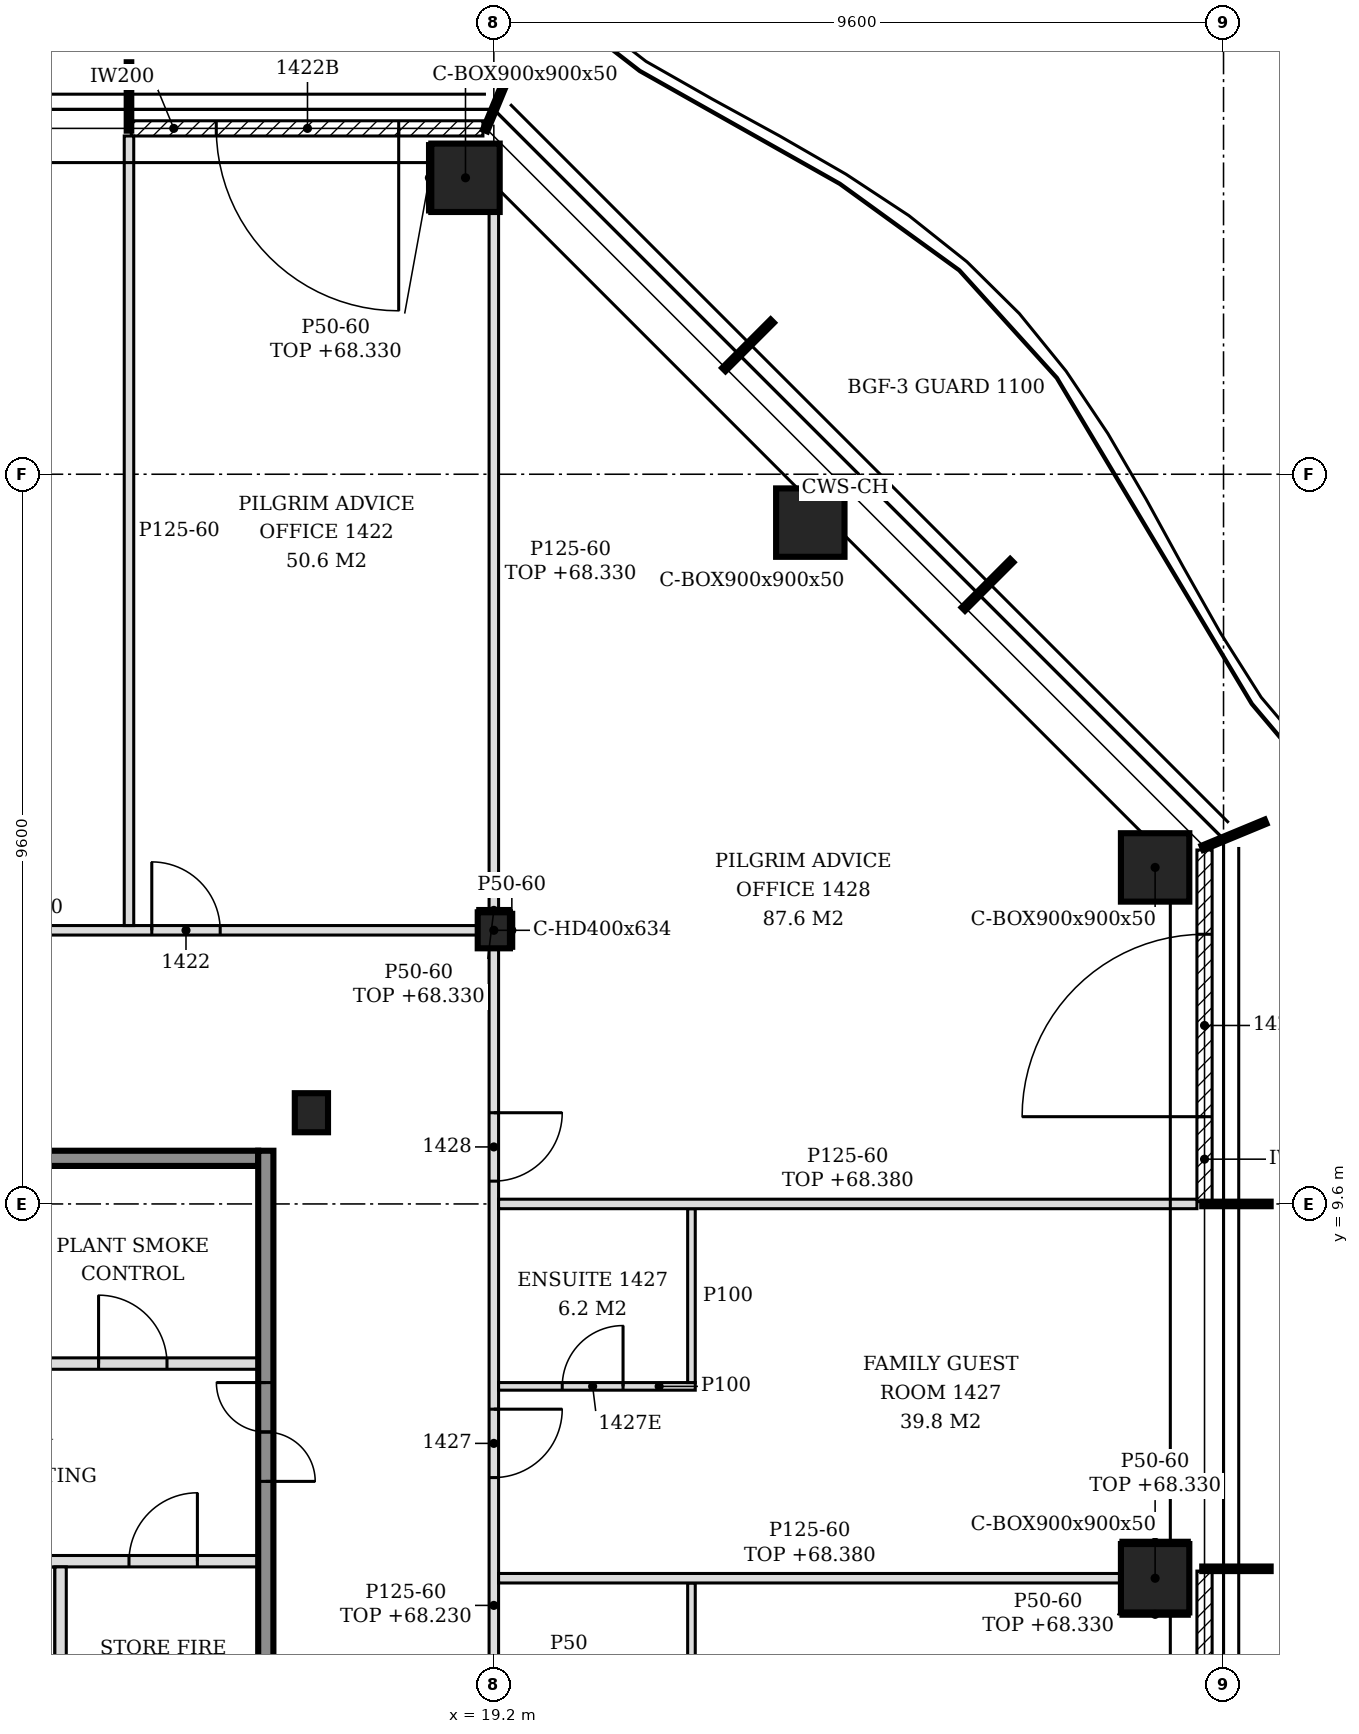
"""IFC4 building model, lengths in metres.
Left out: names, types, materials, properties, quantities, classifications, styles, units other than length and angle.
Written with IfcOpenShell. Run it as: python <this file> out.ifc"""

import sys

from ifc_helpers import new_model, si_unit, direction, frame, frame_2d, origin, origin_2d, place, context, subcontext, project, spatial, polyline, rectangle, hollow_rectangle, i_section, outline, extrude, element, fill, save


model = new_model("IFC4")
c1 = context("Model", 3, precision=1e-05, world=origin(), true_north=direction((0.0, 1.0)))
c2 = subcontext(c1, "Body", "Model", "MODEL_VIEW")
j1 = project(units=[si_unit("LENGTHUNIT", "METRE"), si_unit("PLANEANGLEUNIT", "RADIAN")], contexts=[c1])
p1 = place(None, origin())
s1 = spatial("IfcSite", under=j1, at=p1, CompositionType="ELEMENT")
p2 = place(p1, origin())
s2 = spatial("IfcBuilding", under=s1, at=p2, CompositionType="ELEMENT")
p3 = place(p2, frame((0.0, 0.0, 65.4)))
s3 = spatial("IfcBuildingStorey", under=s2, at=p3, CompositionType="ELEMENT", Elevation=65.4)
for number, where, z_axis, x_axis in (
    (1, (27.9, 4.676, -0.15), (0.0, 0.0, 1.0), (1.0, 0.0, 0.0)),
    (2, (27.9, 14.027, -0.15), (0.0, 0.0, 1.0), (1.0, 0.0, 0.0)),
    (3, (23.364, 18.564, -0.15), (0.0, 0.0, 1.0), (1.0, 0.0, 0.0)),
    (4, (18.827, 23.1, -0.15), (0.0, 0.0, 1.0), (1.0, 0.0, 0.0)),
):
    element("IfcColumn", number, at=place(p3, frame(where, z_axis=z_axis, x_axis=x_axis)), inside=s3, PredefinedType="COLUMN", context=c2, shape_type="SweptSolid", body=[
        extrude(hollow_rectangle(XDim=0.9, YDim=0.9, WallThickness=0.05, at=origin_2d()), origin(), (0.0, 0.0, 1.0), 3.6),
    ])
p4 = place(p3, frame((19.2, 13.2, -0.15), z_axis=(0.0, 0.0, 1.0), x_axis=(1.0, 0.0, 0.0)))
e5 = element("IfcColumn", 5, at=p4, inside=s3, PredefinedType="COLUMN", context=c2, shape_type="SweptSolid", body=[
    extrude(i_section(OverallWidth=0.424, OverallDepth=0.474, WebThickness=0.048, FlangeThickness=0.077, FilletRadius=0.015, at=origin_2d()), origin(), (0.0, 0.0, 1.0), 3.6),
])
p5 = place(p3, frame((16.8, 10.8, -0.15), z_axis=(0.0, 0.0, 1.0), x_axis=(1.0, 0.0, 0.0)))
e6 = element("IfcColumn", 6, at=p5, inside=s3, PredefinedType="COLUMN", context=c2, shape_type="SweptSolid", body=[
    extrude(i_section(OverallWidth=0.437, OverallDepth=0.514, WebThickness=0.061, FlangeThickness=0.097, FilletRadius=0.015, at=origin_2d()), origin(), (0.0, 0.0, 1.0), 3.6),
])
p6 = place(p3, frame((28.55, 0.03, 0.0), z_axis=(0.0, 0.0, 1.0), x_axis=(0.0, 1.0, 0.0)))
e7 = element("IfcWall", 7, at=p6, inside=s3, PredefinedType="NOTDEFINED", context=c2, shape_type="SweptSolid", body=[
    extrude(rectangle(XDim=4.74, YDim=0.2, at=frame_2d((2.37, 0.0))), origin(), (0.0, 0.0, 1.0), 3.45),
])
p7 = place(p6, frame((1.17, 0.0, 0.0)))
e8 = element("IfcOpeningElement", 8, at=p7, cuts=e7, PredefinedType="OPENING", context=c2, shape_type="SweptSolid", body=[
    extrude(rectangle(XDim=2.4, YDim=2.4, at=frame_2d((1.2, 1.2))), frame((0.0, 0.11, 0.0), z_axis=(0.0, -1.0, 0.0), x_axis=(1.0, 0.0, 0.0)), (0.0, 0.0, 1.0), 0.22),
])
p8 = place(p3, frame((28.55, 9.63, 0.0), z_axis=(0.0, 0.0, 1.0), x_axis=(0.0, 1.0, 0.0)))
e9 = element("IfcWall", 9, at=p8, inside=s3, PredefinedType="NOTDEFINED", context=c2, shape_type="SweptSolid", body=[
    extrude(rectangle(XDim=4.626, YDim=0.2, at=frame_2d((2.313, 0.0))), origin(), (0.0, 0.0, 1.0), 3.45),
])
p9 = place(p8, frame((1.118, 0.0, 0.0)))
e10 = element("IfcOpeningElement", 10, at=p9, cuts=e9, PredefinedType="OPENING", context=c2, shape_type="SweptSolid", body=[
    extrude(rectangle(XDim=2.4, YDim=2.4, at=frame_2d((1.2, 1.2))), frame((0.0, 0.11, 0.0), z_axis=(0.0, -1.0, 0.0), x_axis=(1.0, 0.0, 0.0)), (0.0, 0.0, 1.0), 0.22),
])
p10 = place(p3, frame((19.056, 23.75, 0.0), z_axis=(0.0, 0.0, 1.0), x_axis=(-1.0, 0.0, 0.0)))
e11 = element("IfcWall", 11, at=p10, inside=s3, PredefinedType="NOTDEFINED", context=c2, shape_type="SweptSolid", body=[
    extrude(rectangle(XDim=4.626, YDim=0.2, at=frame_2d((2.313, 0.0))), origin(), (0.0, 0.0, 1.0), 3.45),
])
p11 = place(p10, frame((1.108, 0.0, 0.0)))
e12 = element("IfcOpeningElement", 12, at=p11, cuts=e11, PredefinedType="OPENING", context=c2, shape_type="SweptSolid", body=[
    extrude(rectangle(XDim=2.4, YDim=2.4, at=frame_2d((1.2, 1.2))), frame((0.0, 0.11, 0.0), z_axis=(0.0, -1.0, 0.0), x_axis=(1.0, 0.0, 0.0)), (0.0, 0.0, 1.0), 0.22),
])
p12 = place(p3, frame((9.7, 4.9, 0.0), z_axis=(0.0, 0.0, 1.0), x_axis=(1.0, 0.0, 0.0)))
e13 = element("IfcWall", 13, at=p12, inside=s3, PredefinedType="SOLIDWALL", context=c2, shape_type="SweptSolid", body=[
    extrude(rectangle(XDim=6.4, YDim=0.15, at=frame_2d((3.2, 0.0))), origin(), (0.0, 0.0, 1.0), 3.45),
])
p13 = place(p12, frame((0.45, 0.0, 0.0)))
e14 = element("IfcOpeningElement", 14, at=p13, cuts=e13, PredefinedType="OPENING", context=c2, shape_type="SweptSolid", body=[
    extrude(rectangle(XDim=1.0, YDim=2.1, at=frame_2d((0.5, 1.05))), frame((0.0, 0.085, 0.0), z_axis=(0.0, -1.0, 0.0), x_axis=(1.0, 0.0, 0.0)), (0.0, 0.0, 1.0), 0.17),
])
p14 = place(p12, frame((2.35, 0.0, 0.0)))
e15 = element("IfcOpeningElement", 15, at=p14, cuts=e13, PredefinedType="OPENING", context=c2, shape_type="SweptSolid", body=[
    extrude(rectangle(XDim=1.0, YDim=2.1, at=frame_2d((0.5, 1.05))), frame((0.0, 0.085, 0.0), z_axis=(0.0, -1.0, 0.0), x_axis=(1.0, 0.0, 0.0)), (0.0, 0.0, 1.0), 0.17),
])
p15 = place(p12, frame((4.7, 0.0, 0.0)))
e16 = element("IfcOpeningElement", 16, at=p15, cuts=e13, PredefinedType="OPENING", context=c2, shape_type="SweptSolid", body=[
    extrude(rectangle(XDim=0.9, YDim=2.1, at=frame_2d((0.45, 1.05))), frame((0.0, 0.085, 0.0), z_axis=(0.0, -1.0, 0.0), x_axis=(1.0, 0.0, 0.0)), (0.0, 0.0, 1.0), 0.17),
])
p16 = place(p3, frame((12.7, 7.5, 0.0), z_axis=(0.0, 0.0, 1.0), x_axis=(1.0, 0.0, 0.0)))
e17 = element("IfcWall", 17, at=p16, inside=s3, PredefinedType="SOLIDWALL", context=c2, shape_type="SweptSolid", body=[
    extrude(rectangle(XDim=3.4, YDim=0.15, at=frame_2d((1.7, 0.0))), origin(), (0.0, 0.0, 1.0), 3.45),
])
p17 = place(p16, frame((1.3, 0.0, 0.0)))
e18 = element("IfcOpeningElement", 18, at=p17, cuts=e17, PredefinedType="OPENING", context=c2, shape_type="SweptSolid", body=[
    extrude(rectangle(XDim=0.9, YDim=2.1, at=frame_2d((0.45, 1.05))), frame((0.0, 0.085, 0.0), z_axis=(0.0, -1.0, 0.0), x_axis=(1.0, 0.0, 0.0)), (0.0, 0.0, 1.0), 0.17),
])
p18 = place(p3, frame((12.7, 10.2, 0.0), z_axis=(0.0, 0.0, 1.0), x_axis=(1.0, 0.0, 0.0)))
e19 = element("IfcWall", 19, at=p18, inside=s3, PredefinedType="SOLIDWALL", context=c2, shape_type="SweptSolid", body=[
    extrude(rectangle(XDim=3.4, YDim=0.2, at=frame_2d((1.7, 0.0))), origin(), (0.0, 0.0, 1.0), 3.45),
])
p19 = place(p3, frame((13.5, 2.275, 0.0), z_axis=(0.0, 0.0, 1.0), x_axis=(0.0, 1.0, 0.0)))
e20 = element("IfcWall", 20, at=p19, inside=s3, PredefinedType="SOLIDWALL", context=c2, shape_type="SweptSolid", body=[
    extrude(rectangle(XDim=2.55, YDim=0.15, at=frame_2d((1.275, 0.0))), origin(), (0.0, 0.0, 1.0), 3.45),
])
p20 = place(p3, frame((16.2, -5.5, 0.0), z_axis=(0.0, 0.0, 1.0), x_axis=(0.0, 1.0, 0.0)))
e21 = element("IfcWall", 21, at=p20, inside=s3, PredefinedType="SOLIDWALL", context=c2, shape_type="SweptSolid", body=[
    extrude(rectangle(XDim=15.8, YDim=0.2, at=frame_2d((7.9, 0.0))), origin(), (0.0, 0.0, 1.0), 3.45),
])
p21 = place(p20, frame((3.05, 0.0, 0.0)))
e22 = element("IfcOpeningElement", 22, at=p21, cuts=e21, PredefinedType="OPENING", context=c2, shape_type="SweptSolid", body=[
    extrude(rectangle(XDim=1.3, YDim=2.1, at=frame_2d((0.65, 1.05))), frame((0.0, 0.11, 0.0), z_axis=(0.0, -1.0, 0.0), x_axis=(1.0, 0.0, 0.0)), (0.0, 0.0, 1.0), 0.22),
])
p22 = place(p20, frame((11.45, 0.0, 0.0)))
e23 = element("IfcOpeningElement", 23, at=p22, cuts=e21, PredefinedType="OPENING", context=c2, shape_type="SweptSolid", body=[
    extrude(rectangle(XDim=1.3, YDim=2.1, at=frame_2d((0.65, 1.05))), frame((0.0, 0.11, 0.0), z_axis=(0.0, -1.0, 0.0), x_axis=(1.0, 0.0, 0.0)), (0.0, 0.0, 1.0), 0.22),
])
p23 = place(p3, frame((21.8, 2.326, 0.0), z_axis=(0.0, 0.0, 1.0), x_axis=(0.0, 1.0, 0.0)))
e24 = element("IfcWall", 24, at=p23, inside=s3, PredefinedType="PARTITIONING", context=c2, shape_type="SweptSolid", body=[
    extrude(rectangle(XDim=2.288, YDim=0.1, at=frame_2d((1.144, 0.0))), origin(), (0.0, 0.0, 1.0), 3.45),
])
p24 = place(p3, frame((19.2, 2.637, 0.0), z_axis=(0.0, 0.0, 1.0), x_axis=(0.0, 1.0, 0.0)))
e25 = element("IfcWall", 25, at=p24, inside=s3, PredefinedType="PARTITIONING", context=c2, shape_type="SweptSolid", body=[
    extrude(rectangle(XDim=10.326, YDim=0.125, at=frame_2d((5.163, 0.0))), origin(), (0.0, 0.0, 1.0), 2.83),
])
p25 = place(p24, frame((3.363, 0.0, 0.0)))
e26 = element("IfcOpeningElement", 26, at=p25, cuts=e25, PredefinedType="OPENING", context=c2, shape_type="SweptSolid", body=[
    extrude(rectangle(XDim=0.9, YDim=2.1, at=frame_2d((0.45, 1.05))), frame((0.0, 0.073, 0.0), z_axis=(0.0, -1.0, 0.0), x_axis=(1.0, 0.0, 0.0)), (0.0, 0.0, 1.0), 0.145),
])
p26 = place(p24, frame((7.263, 0.0, 0.0)))
e27 = element("IfcOpeningElement", 27, at=p26, cuts=e25, PredefinedType="OPENING", context=c2, shape_type="SweptSolid", body=[
    extrude(rectangle(XDim=0.9, YDim=2.1, at=frame_2d((0.45, 1.05))), frame((0.0, 0.073, 0.0), z_axis=(0.0, -1.0, 0.0), x_axis=(1.0, 0.0, 0.0)), (0.0, 0.0, 1.0), 0.145),
])
p27 = place(p3, frame((19.262, 4.676, 0.0), z_axis=(0.0, 0.0, 1.0), x_axis=(1.0, 0.0, 0.0)))
e28 = element("IfcWall", 28, at=p27, inside=s3, PredefinedType="PARTITIONING", context=c2, shape_type="SweptSolid", body=[
    extrude(outline(polyline([(0.0, 0.0), (8.188, 0.0), (8.188, 2.98), (0.087, 2.98), (0.085, 2.83), (0.0, 2.83), (0.0, 0.0)])), frame((0.0, 0.062, 0.0), z_axis=(0.0, -1.0, 0.0), x_axis=(1.0, 0.0, 0.0)), (0.0, 0.0, 1.0), 0.125),
])
p28 = place(p3, frame((19.262, 7.2, 0.0), z_axis=(0.0, 0.0, 1.0), x_axis=(1.0, 0.0, 0.0)))
e29 = element("IfcWall", 29, at=p28, inside=s3, PredefinedType="PARTITIONING", context=c2, shape_type="SweptSolid", body=[
    extrude(outline(polyline([(0.0, 0.0), (2.588, 0.0), (2.587, 3.45), (0.087, 3.45), (0.085, 2.83), (0.0, 2.83), (0.0, 0.0)])), frame((0.0, 0.05, 0.0), z_axis=(0.0, -1.0, 0.0), x_axis=(1.0, 0.0, 0.0)), (0.0, 0.0, 1.0), 0.1),
])
p29 = place(p28, frame((0.837, 0.0, 0.0)))
e30 = element("IfcOpeningElement", 30, at=p29, cuts=e29, PredefinedType="OPENING", context=c2, shape_type="SweptSolid", body=[
    extrude(rectangle(XDim=0.8, YDim=2.1, at=frame_2d((0.4, 1.05))), frame((0.0, 0.06, 0.0), z_axis=(0.0, -1.0, 0.0), x_axis=(1.0, 0.0, 0.0)), (0.0, 0.0, 1.0), 0.12),
])
p30 = place(p3, frame((21.8, 7.25, 0.0), z_axis=(0.0, 0.0, 1.0), x_axis=(0.0, 1.0, 0.0)))
e31 = element("IfcWall", 31, at=p30, inside=s3, PredefinedType="PARTITIONING", context=c2, shape_type="SweptSolid", body=[
    extrude(outline(polyline([(0.0, 0.0), (2.288, 0.0), (2.288, 2.98), (2.255, 2.98), (2.253, 3.45), (0.0, 3.45), (0.0, 0.0)])), frame((0.0, 0.05, 0.0), z_axis=(0.0, -1.0, 0.0), x_axis=(1.0, 0.0, 0.0)), (0.0, 0.0, 1.0), 0.1),
])
p31 = place(p3, frame((19.262, 9.6, 0.0), z_axis=(0.0, 0.0, 1.0), x_axis=(1.0, 0.0, 0.0)))
e32 = element("IfcWall", 32, at=p31, inside=s3, PredefinedType="PARTITIONING", context=c2, shape_type="SweptSolid", body=[
    extrude(outline(polyline([(0.0, 0.0), (9.188, 0.0), (9.188, 2.98), (8.788, 2.98), (8.785, 2.93), (8.488, 2.93), (8.486, 2.98), (0.087, 2.98), (0.085, 2.83), (0.0, 2.83), (0.0, 0.0)])), frame((0.0, 0.062, 0.0), z_axis=(0.0, -1.0, 0.0), x_axis=(1.0, 0.0, 0.0)), (0.0, 0.0, 1.0), 0.125),
])
p32 = place(p3, frame((7.412, 13.2, 0.0), z_axis=(0.0, 0.0, 1.0), x_axis=(1.0, 0.0, 0.0)))
e33 = element("IfcWall", 33, at=p32, inside=s3, PredefinedType="PARTITIONING", context=c2, shape_type="SweptSolid", body=[
    extrude(rectangle(XDim=11.576, YDim=0.125, at=frame_2d((5.788, 0.0))), origin(), (0.0, 0.0, 1.0), 2.83),
])
p33 = place(p32, frame((0.788, 0.0, 0.0)))
e34 = element("IfcOpeningElement", 34, at=p33, cuts=e33, PredefinedType="OPENING", context=c2, shape_type="SweptSolid", body=[
    extrude(rectangle(XDim=0.9, YDim=2.1, at=frame_2d((0.45, 1.05))), frame((0.0, 0.073, 0.0), z_axis=(0.0, -1.0, 0.0), x_axis=(1.0, 0.0, 0.0)), (0.0, 0.0, 1.0), 0.145),
])
p34 = place(p32, frame((2.302, 0.0, 0.0)))
e35 = element("IfcOpeningElement", 35, at=p34, cuts=e33, PredefinedType="OPENING", context=c2, shape_type="SweptSolid", body=[
    extrude(rectangle(XDim=0.9, YDim=2.1, at=frame_2d((0.45, 1.05))), frame((0.0, 0.073, 0.0), z_axis=(0.0, -1.0, 0.0), x_axis=(1.0, 0.0, 0.0)), (0.0, 0.0, 1.0), 0.145),
])
p35 = place(p32, frame((7.288, 0.0, 0.0)))
e36 = element("IfcOpeningElement", 36, at=p35, cuts=e33, PredefinedType="OPENING", context=c2, shape_type="SweptSolid", body=[
    extrude(rectangle(XDim=0.9, YDim=2.1, at=frame_2d((0.45, 1.05))), frame((0.0, 0.073, 0.0), z_axis=(0.0, -1.0, 0.0), x_axis=(1.0, 0.0, 0.0)), (0.0, 0.0, 1.0), 0.145),
])
p36 = place(p3, frame((14.4, 13.262, 0.0), z_axis=(0.0, 0.0, 1.0), x_axis=(0.0, 1.0, 0.0)))
e37 = element("IfcWall", 37, at=p36, inside=s3, PredefinedType="PARTITIONING", context=c2, shape_type="SweptSolid", body=[
    extrude(outline(polyline([(0.0, 0.0), (10.387, 0.0), (10.387, 3.45), (9.988, 3.45), (9.986, 2.93), (9.688, 2.93), (9.686, 3.45), (6.042, 3.45), (6.041, 2.88), (5.833, 2.88), (5.831, 3.45), (0.087, 3.45), (0.085, 2.83), (0.0, 2.83), (0.0, 0.0)])), frame((0.0, 0.062, 0.0), z_axis=(0.0, -1.0, 0.0), x_axis=(1.0, 0.0, 0.0)), (0.0, 0.0, 1.0), 0.125),
])
p37 = place(p3, frame((19.2, 13.437, 0.0), z_axis=(0.0, 0.0, 1.0), x_axis=(0.0, 1.0, 0.0)))
e38 = element("IfcWall", 38, at=p37, inside=s3, PredefinedType="PARTITIONING", context=c2, shape_type="SweptSolid", body=[
    extrude(outline(polyline([(0.0, 0.0), (9.213, 0.0), (9.213, 2.63), (8.733, 2.63), (8.731, 2.93), (0.0, 2.93), (0.0, 0.0)])), frame((0.0, 0.062, 0.0), z_axis=(0.0, -1.0, 0.0), x_axis=(1.0, 0.0, 0.0)), (0.0, 0.0, 1.0), 0.125),
])
p38 = place(p3, frame((19.437, 12.963, 0.0), z_axis=(0.0, 0.0, 1.0), x_axis=(0.0, 1.0, 0.0)))
e39 = element("IfcWall", 39, at=p38, inside=s3, PredefinedType="PARTITIONING", context=c2, shape_type="SweptSolid", body=[
    extrude(rectangle(XDim=0.474, YDim=0.05, at=frame_2d((0.237, 0.0))), origin(), (0.0, 0.0, 1.0), 3.45),
])
for number, where, z_axis, x_axis in (
    (40, (27.45, 5.151, 0.0), (0.0, 0.0, 1.0), (1.0, 0.0, 0.0)),
    (41, (27.45, 4.201, 0.0), (0.0, 0.0, 1.0), (1.0, 0.0, 0.0)),
):
    element("IfcWall", number, at=place(p3, frame(where, z_axis=z_axis, x_axis=x_axis)), inside=s3, PredefinedType="PARTITIONING", context=c2, shape_type="SweptSolid", body=[
        extrude(rectangle(XDim=0.9, YDim=0.05, at=frame_2d((0.45, 0.0))), origin(), (0.0, 0.0, 1.0), 2.93),
    ])
p39 = place(p3, frame((18.988, 13.462, 0.0), z_axis=(0.0, 0.0, 1.0), x_axis=(1.0, 0.0, 0.0)))
e42 = element("IfcWall", 42, at=p39, inside=s3, PredefinedType="PARTITIONING", context=c2, shape_type="SweptSolid", body=[
    extrude(rectangle(XDim=0.424, YDim=0.05, at=frame_2d((0.212, 0.0))), origin(), (0.0, 0.0, 1.0), 2.93),
])
p40 = place(p3, frame((18.352, 22.65, 0.0), z_axis=(0.0, 0.0, 1.0), x_axis=(0.0, 1.0, 0.0)))
e43 = element("IfcWall", 43, at=p40, inside=s3, PredefinedType="PARTITIONING", context=c2, shape_type="SweptSolid", body=[
    extrude(rectangle(XDim=0.9, YDim=0.05, at=frame_2d((0.45, 0.0))), origin(), (0.0, 0.0, 1.0), 2.93),
])
p41 = place(p9, origin())
e44 = element("IfcDoor", 44, at=p41, inside=s3, OperationType="SINGLE_SWING_LEFT", PredefinedType="DOOR", context=c2, shape_type="SweptSolid", body=[
    extrude(rectangle(XDim=2.4, YDim=2.4, at=frame_2d((1.2, 1.2))), frame((0.0, 0.025, 0.0), z_axis=(0.0, -1.0, 0.0), x_axis=(1.0, 0.0, 0.0)), (0.0, 0.0, 1.0), 0.05),
])
fill(e10, e44)
p42 = place(p11, origin())
e45 = element("IfcDoor", 45, at=p42, inside=s3, OperationType="SINGLE_SWING_LEFT", PredefinedType="DOOR", context=c2, shape_type="SweptSolid", body=[
    extrude(rectangle(XDim=2.4, YDim=2.4, at=frame_2d((1.2, 1.2))), frame((0.0, 0.025, 0.0), z_axis=(0.0, -1.0, 0.0), x_axis=(1.0, 0.0, 0.0)), (0.0, 0.0, 1.0), 0.05),
])
fill(e12, e45)
p43 = place(p22, origin())
e46 = element("IfcDoor", 46, at=p43, inside=s3, OperationType="DOUBLE_DOOR_SINGLE_SWING", PredefinedType="DOOR", context=c2, shape_type="SweptSolid", body=[
    extrude(rectangle(XDim=1.3, YDim=2.1, at=frame_2d((0.65, 1.05))), frame((0.0, 0.025, 0.0), z_axis=(0.0, -1.0, 0.0), x_axis=(1.0, 0.0, 0.0)), (0.0, 0.0, 1.0), 0.05),
])
fill(e23, e46)
p44 = place(p15, origin())
e47 = element("IfcDoor", 47, at=p44, inside=s3, OperationType="SINGLE_SWING_RIGHT", PredefinedType="DOOR", context=c2, shape_type="SweptSolid", body=[
    extrude(rectangle(XDim=0.9, YDim=2.1, at=frame_2d((0.45, 1.05))), frame((0.0, 0.025, 0.0), z_axis=(0.0, -1.0, 0.0), x_axis=(1.0, 0.0, 0.0)), (0.0, 0.0, 1.0), 0.05),
])
fill(e16, e47)
p45 = place(p17, origin())
e48 = element("IfcDoor", 48, at=p45, inside=s3, OperationType="SINGLE_SWING_LEFT", PredefinedType="DOOR", context=c2, shape_type="SweptSolid", body=[
    extrude(rectangle(XDim=0.9, YDim=2.1, at=frame_2d((0.45, 1.05))), frame((0.0, 0.025, 0.0), z_axis=(0.0, -1.0, 0.0), x_axis=(1.0, 0.0, 0.0)), (0.0, 0.0, 1.0), 0.05),
])
fill(e18, e48)
p46 = place(p35, origin())
e49 = element("IfcDoor", 49, at=p46, inside=s3, OperationType="SINGLE_SWING_LEFT", PredefinedType="DOOR", context=c2, shape_type="SweptSolid", body=[
    extrude(rectangle(XDim=0.9, YDim=2.1, at=frame_2d((0.45, 1.05))), frame((0.0, 0.025, 0.0), z_axis=(0.0, -1.0, 0.0), x_axis=(1.0, 0.0, 0.0)), (0.0, 0.0, 1.0), 0.05),
])
fill(e36, e49)
p47 = place(p25, frame((0.9, 0.0, 0.0), z_axis=(0.0, 0.0, 1.0), x_axis=(-1.0, 0.0, 0.0)))
e50 = element("IfcDoor", 50, at=p47, inside=s3, OperationType="SINGLE_SWING_LEFT", PredefinedType="DOOR", context=c2, shape_type="SweptSolid", body=[
    extrude(rectangle(XDim=0.9, YDim=2.1, at=frame_2d((0.45, 1.05))), frame((0.0, 0.025, 0.0), z_axis=(0.0, -1.0, 0.0), x_axis=(1.0, 0.0, 0.0)), (0.0, 0.0, 1.0), 0.05),
])
fill(e26, e50)
p48 = place(p29, origin())
e51 = element("IfcDoor", 51, at=p48, inside=s3, OperationType="SINGLE_SWING_RIGHT", PredefinedType="DOOR", context=c2, shape_type="SweptSolid", body=[
    extrude(rectangle(XDim=0.8, YDim=2.1, at=frame_2d((0.4, 1.05))), frame((0.0, 0.025, 0.0), z_axis=(0.0, -1.0, 0.0), x_axis=(1.0, 0.0, 0.0)), (0.0, 0.0, 1.0), 0.05),
])
fill(e30, e51)
p49 = place(p26, frame((0.9, 0.0, 0.0), z_axis=(0.0, 0.0, 1.0), x_axis=(-1.0, 0.0, 0.0)))
e52 = element("IfcDoor", 52, at=p49, inside=s3, OperationType="SINGLE_SWING_LEFT", PredefinedType="DOOR", context=c2, shape_type="SweptSolid", body=[
    extrude(rectangle(XDim=0.9, YDim=2.1, at=frame_2d((0.45, 1.05))), frame((0.0, 0.025, 0.0), z_axis=(0.0, -1.0, 0.0), x_axis=(1.0, 0.0, 0.0)), (0.0, 0.0, 1.0), 0.05),
])
fill(e27, e52)
save(model, sys.argv[1])
